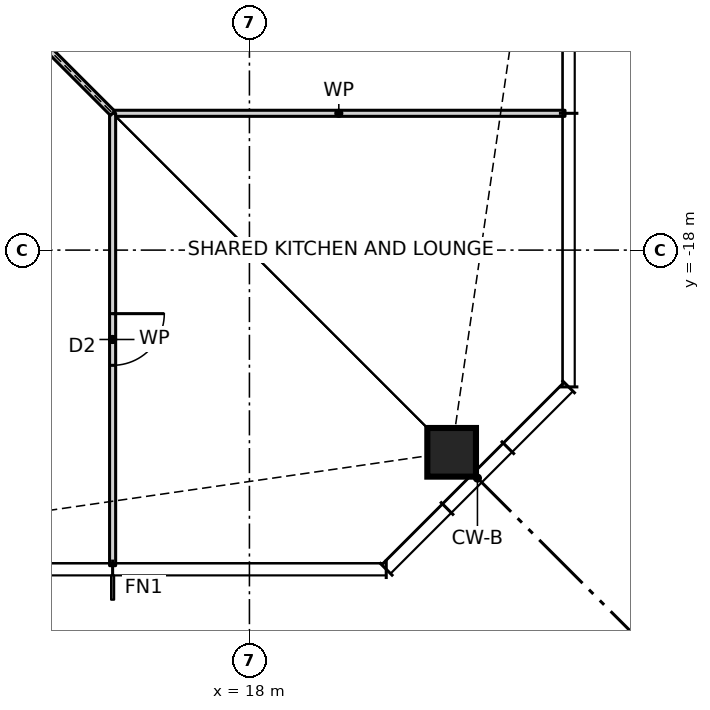
"""IFC4 building model, lengths in metres.
Left out: names, types, materials, properties, quantities, classifications, styles, units other than length and angle.
Written with IfcOpenShell. Run it as: python <this file> out.ifc"""

import sys

from ifc_helpers import new_model, si_unit, direction, frame, frame_2d, origin, origin_2d, place, context, subcontext, project, spatial, rectangle, hollow_rectangle, extrude, element, fill, save


model = new_model("IFC4")
c1 = context("Model", 3, precision=1e-05, world=origin(), true_north=direction((0.0, 1.0)))
c2 = subcontext(c1, "Body", "Model", "MODEL_VIEW")
j1 = project(units=[si_unit("LENGTHUNIT", "METRE"), si_unit("PLANEANGLEUNIT", "RADIAN")], contexts=[c1])
p1 = place(None, origin())
s1 = spatial("IfcSite", under=j1, at=p1, CompositionType="ELEMENT")
p2 = place(p1, origin())
s2 = spatial("IfcBuilding", under=s1, at=p2, CompositionType="ELEMENT")
p3 = place(p2, frame((0.0, 0.0, 39.5)))
s3 = spatial("IfcBuildingStorey", under=s2, at=p3, CompositionType="ELEMENT", Elevation=39.5)
p4 = place(p3, frame((21.326, -21.326, 0.0), z_axis=(0.0, 0.0, 1.0), x_axis=(1.0, 0.0, 0.0)))
e1 = element("IfcColumn", 1, at=p4, inside=s3, PredefinedType="COLUMN", context=c2, shape_type="SweptSolid", body=[
    extrude(hollow_rectangle(XDim=0.8, YDim=0.8, WallThickness=0.09, at=origin_2d()), origin(), (0.0, 0.0, 1.0), 3.5),
])
p5 = place(p3, frame((15.75, -15.75, 0.0), z_axis=(0.0, 0.0, 1.0), x_axis=(1.0, 0.0, 0.0)))
e2 = element("IfcWall", 2, at=p5, inside=s3, PredefinedType="PARTITIONING", context=c2, shape_type="SweptSolid", body=[
    extrude(rectangle(XDim=7.44, YDim=0.1, at=frame_2d((3.72, 0.0))), origin(), (0.0, 0.0, 1.0), 3.27),
])
p6 = place(p3, frame((15.75, -23.19, 0.0), z_axis=(0.0, 0.0, 1.0), x_axis=(0.0, 1.0, 0.0)))
e3 = element("IfcWall", 3, at=p6, inside=s3, PredefinedType="PARTITIONING", context=c2, shape_type="SweptSolid", body=[
    extrude(rectangle(XDim=7.44, YDim=0.1, at=frame_2d((3.72, 0.0))), origin(), (0.0, 0.0, 1.0), 3.27),
])
p7 = place(p6, frame((3.295, 0.0, 0.0)))
e4 = element("IfcOpeningElement", 4, at=p7, cuts=e3, PredefinedType="OPENING", context=c2, shape_type="SweptSolid", body=[
    extrude(rectangle(XDim=0.85, YDim=2.1, at=frame_2d((0.425, 1.05))), frame((0.0, 0.06, 0.0), z_axis=(0.0, -1.0, 0.0), x_axis=(1.0, 0.0, 0.0)), (0.0, 0.0, 1.0), 0.12),
])
p8 = place(p3, frame((15.75, -15.75, 0.0), z_axis=(0.0, 0.0, 1.0), x_axis=(-0.707106781187, 0.707106781187, 0.0)))
e5 = element("IfcWall", 5, at=p8, inside=s3, PredefinedType="PARTITIONING", context=c2, shape_type="SweptSolid", body=[
    extrude(rectangle(XDim=5.869, YDim=0.1, at=frame_2d((2.935, 0.0))), origin(), (0.0, 0.0, 1.0), 2.343),
])
p9 = place(p7, frame((0.85, 0.0, 0.0), z_axis=(0.0, 0.0, 1.0), x_axis=(-1.0, 0.0, 0.0)))
e6 = element("IfcDoor", 6, at=p9, inside=s3, OperationType="SINGLE_SWING_LEFT", PredefinedType="DOOR", context=c2, shape_type="SweptSolid", body=[
    extrude(rectangle(XDim=0.85, YDim=2.1, at=frame_2d((0.425, 1.05))), frame((0.0, 0.025, 0.0), z_axis=(0.0, -1.0, 0.0), x_axis=(1.0, 0.0, 0.0)), (0.0, 0.0, 1.0), 0.05),
])
fill(e4, e6)
save(model, sys.argv[1])
